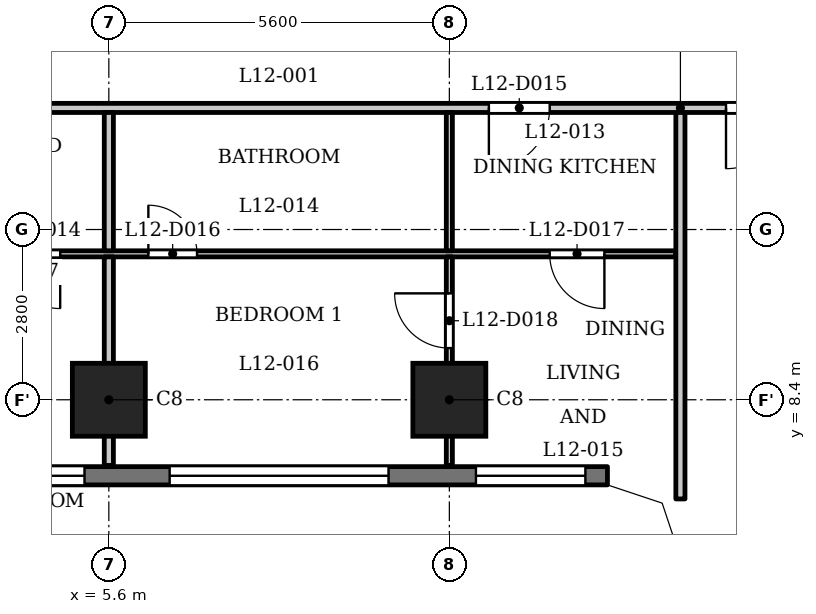
"""IFC4 building model, lengths in metres.
Left out: names, types, materials, properties, quantities, classifications, styles, units other than length and angle.
Written with IfcOpenShell. Run it as: python <this file> out.ifc"""

import sys

from ifc_helpers import new_model, si_unit, direction, frame, frame_2d, origin, origin_2d, place, context, subcontext, project, spatial, polyline, rectangle, outline, extrude, element, fill, save


model = new_model("IFC4")
c1 = context("Model", 3, precision=1e-05, world=origin(), true_north=direction((0.0, 1.0)))
c2 = subcontext(c1, "Body", "Model", "MODEL_VIEW")
j1 = project(units=[si_unit("LENGTHUNIT", "METRE"), si_unit("PLANEANGLEUNIT", "RADIAN")], contexts=[c1])
p1 = place(None, origin())
s1 = spatial("IfcSite", under=j1, at=p1, CompositionType="ELEMENT")
p2 = place(p1, origin())
s2 = spatial("IfcBuilding", under=s1, at=p2, CompositionType="ELEMENT")
p3 = place(p2, frame((0.0, 0.0, 51.5)))
s3 = spatial("IfcBuildingStorey", under=s2, at=p3, CompositionType="ELEMENT", Elevation=51.5)
for number, where, z_axis, x_axis in (
    (1, (5.6, 8.4, 0.0), (0.0, 0.0, 1.0), (1.0, 0.0, 0.0)),
    (2, (11.2, 8.4, 0.0), (0.0, 0.0, 1.0), (1.0, 0.0, 0.0)),
):
    element("IfcColumn", number, at=place(p3, frame(where, z_axis=z_axis, x_axis=x_axis)), inside=s3, PredefinedType="COLUMN", context=c2, shape_type="SweptSolid", body=[
        extrude(rectangle(XDim=1.2, YDim=1.2, at=origin_2d()), origin(), (0.0, 0.0, 1.0), 3.5),
    ])
p4 = place(p3, frame((-13.8, 7.15, 0.0), z_axis=(0.0, 0.0, 1.0), x_axis=(1.0, 0.0, 0.0)))
e3 = element("IfcWall", 3, at=p4, inside=s3, PredefinedType="SOLIDWALL", context=c2, shape_type="SweptSolid", body=[
    extrude(rectangle(XDim=27.6, YDim=0.3, at=frame_2d((13.8, 0.0))), origin(), (0.0, 0.0, 1.0), 3.2),
])
p5 = place(p4, frame((0.363, 0.0, 0.9)))
e4 = element("IfcOpeningElement", 4, at=p5, cuts=e3, PredefinedType="OPENING", context=c2, shape_type="SweptSolid", body=[
    extrude(rectangle(XDim=1.8, YDim=1.25, at=frame_2d((0.9, 0.625))), frame((0.0, 0.16, 0.0), z_axis=(0.0, -1.0, 0.0), x_axis=(1.0, 0.0, 0.0)), (0.0, 0.0, 1.0), 0.32),
])
p6 = place(p4, frame((3.6, 0.0, 1.2)))
e5 = element("IfcOpeningElement", 5, at=p6, cuts=e3, PredefinedType="OPENING", context=c2, shape_type="SweptSolid", body=[
    extrude(rectangle(XDim=3.6, YDim=0.95, at=frame_2d((1.8, 0.475))), frame((0.0, 0.16, 0.0), z_axis=(0.0, -1.0, 0.0), x_axis=(1.0, 0.0, 0.0)), (0.0, 0.0, 1.0), 0.32),
])
p7 = place(p4, frame((9.2, 0.0, 1.2)))
e6 = element("IfcOpeningElement", 6, at=p7, cuts=e3, PredefinedType="OPENING", context=c2, shape_type="SweptSolid", body=[
    extrude(rectangle(XDim=3.6, YDim=0.95, at=frame_2d((1.8, 0.475))), frame((0.0, 0.16, 0.0), z_axis=(0.0, -1.0, 0.0), x_axis=(1.0, 0.0, 0.0)), (0.0, 0.0, 1.0), 0.32),
])
p8 = place(p4, frame((14.4, 0.0, 0.9)))
e7 = element("IfcOpeningElement", 7, at=p8, cuts=e3, PredefinedType="OPENING", context=c2, shape_type="SweptSolid", body=[
    extrude(rectangle(XDim=1.8, YDim=1.25, at=frame_2d((0.9, 0.625))), frame((0.0, 0.16, 0.0), z_axis=(0.0, -1.0, 0.0), x_axis=(1.0, 0.0, 0.0)), (0.0, 0.0, 1.0), 0.32),
])
p9 = place(p4, frame((17.2, 0.0, 0.9)))
e8 = element("IfcOpeningElement", 8, at=p9, cuts=e3, PredefinedType="OPENING", context=c2, shape_type="SweptSolid", body=[
    extrude(rectangle(XDim=1.8, YDim=1.25, at=frame_2d((0.9, 0.625))), frame((0.0, 0.16, 0.0), z_axis=(0.0, -1.0, 0.0), x_axis=(1.0, 0.0, 0.0)), (0.0, 0.0, 1.0), 0.32),
])
p10 = place(p4, frame((20.4, 0.0, 1.2)))
e9 = element("IfcOpeningElement", 9, at=p10, cuts=e3, PredefinedType="OPENING", context=c2, shape_type="SweptSolid", body=[
    extrude(rectangle(XDim=3.6, YDim=0.95, at=frame_2d((1.8, 0.475))), frame((0.0, 0.16, 0.0), z_axis=(0.0, -1.0, 0.0), x_axis=(1.0, 0.0, 0.0)), (0.0, 0.0, 1.0), 0.32),
])
p11 = place(p4, frame((25.438, 0.0, 0.9)))
e10 = element("IfcOpeningElement", 10, at=p11, cuts=e3, PredefinedType="OPENING", context=c2, shape_type="SweptSolid", body=[
    extrude(rectangle(XDim=1.8, YDim=1.25, at=frame_2d((0.9, 0.625))), frame((0.0, 0.16, 0.0), z_axis=(0.0, -1.0, 0.0), x_axis=(1.0, 0.0, 0.0)), (0.0, 0.0, 1.0), 0.32),
])
p12 = place(p3, frame((-14.925, 10.8, 0.0), z_axis=(0.0, 0.0, 1.0), x_axis=(1.0, 0.0, 0.0)))
e11 = element("IfcWall", 11, at=p12, inside=s3, PredefinedType="PARTITIONING", context=c2, shape_type="SweptSolid", body=[
    extrude(rectangle(XDim=29.85, YDim=0.1, at=frame_2d((14.925, 0.0))), origin(), (0.0, 0.0, 1.0), 3.2),
])
p13 = place(p12, frame((0.525, 0.0, 0.0)))
e12 = element("IfcOpeningElement", 12, at=p13, cuts=e11, PredefinedType="OPENING", context=c2, shape_type="SweptSolid", body=[
    extrude(rectangle(XDim=0.8, YDim=2.1, at=frame_2d((0.4, 1.05))), frame((0.0, 0.06, 0.0), z_axis=(0.0, -1.0, 0.0), x_axis=(1.0, 0.0, 0.0)), (0.0, 0.0, 1.0), 0.12),
])
p14 = place(p12, frame((5.375, 0.0, 0.0)))
e13 = element("IfcOpeningElement", 13, at=p14, cuts=e11, PredefinedType="OPENING", context=c2, shape_type="SweptSolid", body=[
    extrude(rectangle(XDim=0.9, YDim=2.1, at=frame_2d((0.45, 1.05))), frame((0.0, 0.06, 0.0), z_axis=(0.0, -1.0, 0.0), x_axis=(1.0, 0.0, 0.0)), (0.0, 0.0, 1.0), 0.12),
])
p15 = place(p12, frame((10.875, 0.0, 0.0)))
e14 = element("IfcOpeningElement", 14, at=p15, cuts=e11, PredefinedType="OPENING", context=c2, shape_type="SweptSolid", body=[
    extrude(rectangle(XDim=0.8, YDim=2.1, at=frame_2d((0.4, 1.05))), frame((0.0, 0.06, 0.0), z_axis=(0.0, -1.0, 0.0), x_axis=(1.0, 0.0, 0.0)), (0.0, 0.0, 1.0), 0.12),
])
p16 = place(p12, frame((12.975, 0.0, 0.0)))
e15 = element("IfcOpeningElement", 15, at=p16, cuts=e11, PredefinedType="OPENING", context=c2, shape_type="SweptSolid", body=[
    extrude(rectangle(XDim=0.9, YDim=2.1, at=frame_2d((0.45, 1.05))), frame((0.0, 0.06, 0.0), z_axis=(0.0, -1.0, 0.0), x_axis=(1.0, 0.0, 0.0)), (0.0, 0.0, 1.0), 0.12),
])
p17 = place(p12, frame((16.575, 0.0, 0.0)))
e16 = element("IfcOpeningElement", 16, at=p17, cuts=e11, PredefinedType="OPENING", context=c2, shape_type="SweptSolid", body=[
    extrude(rectangle(XDim=0.9, YDim=2.1, at=frame_2d((0.45, 1.05))), frame((0.0, 0.06, 0.0), z_axis=(0.0, -1.0, 0.0), x_axis=(1.0, 0.0, 0.0)), (0.0, 0.0, 1.0), 0.12),
])
p18 = place(p12, frame((18.825, 0.0, 0.0)))
e17 = element("IfcOpeningElement", 17, at=p18, cuts=e11, PredefinedType="OPENING", context=c2, shape_type="SweptSolid", body=[
    extrude(rectangle(XDim=0.9, YDim=2.1, at=frame_2d((0.45, 1.05))), frame((0.0, 0.06, 0.0), z_axis=(0.0, -1.0, 0.0), x_axis=(1.0, 0.0, 0.0)), (0.0, 0.0, 1.0), 0.12),
])
p19 = place(p12, frame((21.175, 0.0, 0.0)))
e18 = element("IfcOpeningElement", 18, at=p19, cuts=e11, PredefinedType="OPENING", context=c2, shape_type="SweptSolid", body=[
    extrude(rectangle(XDim=0.8, YDim=2.1, at=frame_2d((0.4, 1.05))), frame((0.0, 0.06, 0.0), z_axis=(0.0, -1.0, 0.0), x_axis=(1.0, 0.0, 0.0)), (0.0, 0.0, 1.0), 0.12),
])
p20 = place(p12, frame((27.775, 0.0, 0.0)))
e19 = element("IfcOpeningElement", 19, at=p20, cuts=e11, PredefinedType="OPENING", context=c2, shape_type="SweptSolid", body=[
    extrude(rectangle(XDim=0.9, YDim=2.1, at=frame_2d((0.45, 1.05))), frame((0.0, 0.06, 0.0), z_axis=(0.0, -1.0, 0.0), x_axis=(1.0, 0.0, 0.0)), (0.0, 0.0, 1.0), 0.12),
])
p21 = place(p3, frame((-17.4, 13.2, 0.0), z_axis=(0.0, 0.0, 1.0), x_axis=(1.0, 0.0, 0.0)))
e20 = element("IfcWall", 20, at=p21, inside=s3, PredefinedType="PARTITIONING", context=c2, shape_type="SweptSolid", body=[
    extrude(rectangle(XDim=34.8, YDim=0.15, at=frame_2d((17.4, 0.0))), origin(), (0.0, 0.0, 1.0), 3.2),
])
p22 = place(p21, frame((0.75, 0.0, 0.0)))
e21 = element("IfcOpeningElement", 21, at=p22, cuts=e20, PredefinedType="OPENING", context=c2, shape_type="SweptSolid", body=[
    extrude(rectangle(XDim=1.0, YDim=2.1, at=frame_2d((0.5, 1.05))), frame((0.0, 0.085, 0.0), z_axis=(0.0, -1.0, 0.0), x_axis=(1.0, 0.0, 0.0)), (0.0, 0.0, 1.0), 0.17),
])
p23 = place(p21, frame((33.15, 0.0, 0.0)))
e22 = element("IfcOpeningElement", 22, at=p23, cuts=e20, PredefinedType="OPENING", context=c2, shape_type="SweptSolid", body=[
    extrude(rectangle(XDim=1.0, YDim=2.1, at=frame_2d((0.5, 1.05))), frame((0.0, 0.085, 0.0), z_axis=(0.0, -1.0, 0.0), x_axis=(1.0, 0.0, 0.0)), (0.0, 0.0, 1.0), 0.17),
])
p24 = place(p21, frame((6.85, 0.0, 0.0)))
e23 = element("IfcOpeningElement", 23, at=p24, cuts=e20, PredefinedType="OPENING", context=c2, shape_type="SweptSolid", body=[
    extrude(rectangle(XDim=1.0, YDim=2.1, at=frame_2d((0.5, 1.05))), frame((0.0, 0.085, 0.0), z_axis=(0.0, -1.0, 0.0), x_axis=(1.0, 0.0, 0.0)), (0.0, 0.0, 1.0), 0.17),
])
p25 = place(p21, frame((18.05, 0.0, 0.0)))
e24 = element("IfcOpeningElement", 24, at=p25, cuts=e20, PredefinedType="OPENING", context=c2, shape_type="SweptSolid", body=[
    extrude(rectangle(XDim=1.0, YDim=2.1, at=frame_2d((0.5, 1.05))), frame((0.0, 0.085, 0.0), z_axis=(0.0, -1.0, 0.0), x_axis=(1.0, 0.0, 0.0)), (0.0, 0.0, 1.0), 0.17),
])
p26 = place(p21, frame((29.25, 0.0, 0.0)))
e25 = element("IfcOpeningElement", 25, at=p26, cuts=e20, PredefinedType="OPENING", context=c2, shape_type="SweptSolid", body=[
    extrude(rectangle(XDim=1.0, YDim=2.1, at=frame_2d((0.5, 1.05))), frame((0.0, 0.085, 0.0), z_axis=(0.0, -1.0, 0.0), x_axis=(1.0, 0.0, 0.0)), (0.0, 0.0, 1.0), 0.17),
])
p27 = place(p3, frame((5.6, 7.32, 0.0), z_axis=(0.0, 0.0, 1.0), x_axis=(0.0, 1.0, 0.0)))
e26 = element("IfcWall", 26, at=p27, inside=s3, PredefinedType="PARTITIONING", context=c2, shape_type="SweptSolid", body=[
    extrude(rectangle(XDim=3.43, YDim=0.15, at=frame_2d((1.715, 0.0))), origin(), (0.0, 0.0, 1.0), 3.2),
])
p28 = place(p3, frame((5.6, 10.85, 0.0), z_axis=(0.0, 0.0, 1.0), x_axis=(0.0, 1.0, 0.0)))
e27 = element("IfcWall", 27, at=p28, inside=s3, PredefinedType="PARTITIONING", context=c2, shape_type="SweptSolid", body=[
    extrude(rectangle(XDim=2.275, YDim=0.15, at=frame_2d((1.137, 0.0))), origin(), (0.0, 0.0, 1.0), 3.2),
])
p29 = place(p3, frame((11.2, 7.32, 0.0), z_axis=(0.0, 0.0, 1.0), x_axis=(0.0, 1.0, 0.0)))
e28 = element("IfcWall", 28, at=p29, inside=s3, PredefinedType="PARTITIONING", context=c2, shape_type="SweptSolid", body=[
    extrude(rectangle(XDim=3.43, YDim=0.1, at=frame_2d((1.715, 0.0))), origin(), (0.0, 0.0, 1.0), 3.2),
])
p30 = place(p29, frame((1.93, 0.0, 0.0)))
e29 = element("IfcOpeningElement", 29, at=p30, cuts=e28, PredefinedType="OPENING", context=c2, shape_type="SweptSolid", body=[
    extrude(rectangle(XDim=0.9, YDim=2.1, at=frame_2d((0.45, 1.05))), frame((0.0, 0.06, 0.0), z_axis=(0.0, -1.0, 0.0), x_axis=(1.0, 0.0, 0.0)), (0.0, 0.0, 1.0), 0.12),
])
p31 = place(p3, frame((11.2, 10.85, 0.0), z_axis=(0.0, 0.0, 1.0), x_axis=(0.0, 1.0, 0.0)))
e30 = element("IfcWall", 30, at=p31, inside=s3, PredefinedType="PARTITIONING", context=c2, shape_type="SweptSolid", body=[
    extrude(rectangle(XDim=2.275, YDim=0.1, at=frame_2d((1.137, 0.0))), origin(), (0.0, 0.0, 1.0), 3.2),
])
p32 = place(p3, frame((15.0, 6.769, 0.0), z_axis=(0.0, 0.0, 1.0), x_axis=(0.0, 1.0, 0.0)))
e31 = element("IfcWall", 31, at=p32, inside=s3, PredefinedType="PARTITIONING", context=c2, shape_type="SweptSolid", body=[
    extrude(rectangle(XDim=6.356, YDim=0.15, at=frame_2d((3.178, 0.0))), origin(), (0.0, 0.0, 1.0), 3.2),
])
p33 = place(p3, origin())
e32 = element("IfcWall", 32, at=p33, inside=s3, PredefinedType="SOLIDWALL", context=c2, shape_type="SweptSolid", body=[
    extrude(outline(polyline([(14.937, 6.937), (13.849, 7.3), (13.8, 7.3), (13.8, 7.0), (14.7, 6.7), (15.0, 5.8), (15.3, 5.8), (15.3, 5.849), (14.937, 6.937)])), origin(), (0.0, 0.0, 1.0), 3.2),
])
p34 = place(p23, origin())
e33 = element("IfcDoor", 33, at=p34, inside=s3, OperationType="SINGLE_SWING_LEFT", PredefinedType="DOOR", context=c2, shape_type="SweptSolid", body=[
    extrude(rectangle(XDim=1.0, YDim=2.1, at=frame_2d((0.5, 1.05))), frame((0.0, 0.025, 0.0), z_axis=(0.0, -1.0, 0.0), x_axis=(1.0, 0.0, 0.0)), (0.0, 0.0, 1.0), 0.05),
])
fill(e22, e33)
p35 = place(p18, origin())
e34 = element("IfcDoor", 34, at=p35, inside=s3, OperationType="SINGLE_SWING_RIGHT", PredefinedType="DOOR", context=c2, shape_type="SweptSolid", body=[
    extrude(rectangle(XDim=0.9, YDim=2.1, at=frame_2d((0.45, 1.05))), frame((0.0, 0.025, 0.0), z_axis=(0.0, -1.0, 0.0), x_axis=(1.0, 0.0, 0.0)), (0.0, 0.0, 1.0), 0.05),
])
fill(e17, e34)
p36 = place(p26, origin())
e35 = element("IfcDoor", 35, at=p36, inside=s3, OperationType="SINGLE_SWING_LEFT", PredefinedType="DOOR", context=c2, shape_type="SweptSolid", body=[
    extrude(rectangle(XDim=1.0, YDim=2.1, at=frame_2d((0.5, 1.05))), frame((0.0, 0.025, 0.0), z_axis=(0.0, -1.0, 0.0), x_axis=(1.0, 0.0, 0.0)), (0.0, 0.0, 1.0), 0.05),
])
fill(e25, e35)
p37 = place(p19, origin())
e36 = element("IfcDoor", 36, at=p37, inside=s3, OperationType="SINGLE_SWING_RIGHT", PredefinedType="DOOR", context=c2, shape_type="SweptSolid", body=[
    extrude(rectangle(XDim=0.8, YDim=2.1, at=frame_2d((0.4, 1.05))), frame((0.0, 0.025, 0.0), z_axis=(0.0, -1.0, 0.0), x_axis=(1.0, 0.0, 0.0)), (0.0, 0.0, 1.0), 0.05),
])
fill(e18, e36)
p38 = place(p20, origin())
e37 = element("IfcDoor", 37, at=p38, inside=s3, OperationType="SINGLE_SWING_RIGHT", PredefinedType="DOOR", context=c2, shape_type="SweptSolid", body=[
    extrude(rectangle(XDim=0.9, YDim=2.1, at=frame_2d((0.45, 1.05))), frame((0.0, 0.025, 0.0), z_axis=(0.0, -1.0, 0.0), x_axis=(1.0, 0.0, 0.0)), (0.0, 0.0, 1.0), 0.05),
])
fill(e19, e37)
p39 = place(p30, origin())
e38 = element("IfcDoor", 38, at=p39, inside=s3, OperationType="SINGLE_SWING_LEFT", PredefinedType="DOOR", context=c2, shape_type="SweptSolid", body=[
    extrude(rectangle(XDim=0.9, YDim=2.1, at=frame_2d((0.45, 1.05))), frame((0.0, 0.025, 0.0), z_axis=(0.0, -1.0, 0.0), x_axis=(1.0, 0.0, 0.0)), (0.0, 0.0, 1.0), 0.05),
])
fill(e29, e38)
p40 = place(p9, origin())
e39 = element("IfcWindow", 39, at=p40, inside=s3, PartitioningType="SINGLE_PANEL", PredefinedType="WINDOW", context=c2, shape_type="SweptSolid", body=[
    extrude(rectangle(XDim=1.8, YDim=1.25, at=frame_2d((0.9, 0.625))), frame((0.0, 0.03, 0.0), z_axis=(0.0, -1.0, 0.0), x_axis=(1.0, 0.0, 0.0)), (0.0, 0.0, 1.0), 0.06),
])
fill(e8, e39)
p41 = place(p10, origin())
e40 = element("IfcWindow", 40, at=p41, inside=s3, PartitioningType="SINGLE_PANEL", PredefinedType="WINDOW", context=c2, shape_type="SweptSolid", body=[
    extrude(rectangle(XDim=3.6, YDim=0.95, at=frame_2d((1.8, 0.475))), frame((0.0, 0.03, 0.0), z_axis=(0.0, -1.0, 0.0), x_axis=(1.0, 0.0, 0.0)), (0.0, 0.0, 1.0), 0.06),
])
fill(e9, e40)
p42 = place(p11, origin())
e41 = element("IfcWindow", 41, at=p42, inside=s3, PartitioningType="SINGLE_PANEL", PredefinedType="WINDOW", context=c2, shape_type="SweptSolid", body=[
    extrude(rectangle(XDim=1.8, YDim=1.25, at=frame_2d((0.9, 0.625))), frame((0.0, 0.03, 0.0), z_axis=(0.0, -1.0, 0.0), x_axis=(1.0, 0.0, 0.0)), (0.0, 0.0, 1.0), 0.06),
])
fill(e10, e41)
save(model, sys.argv[1])
